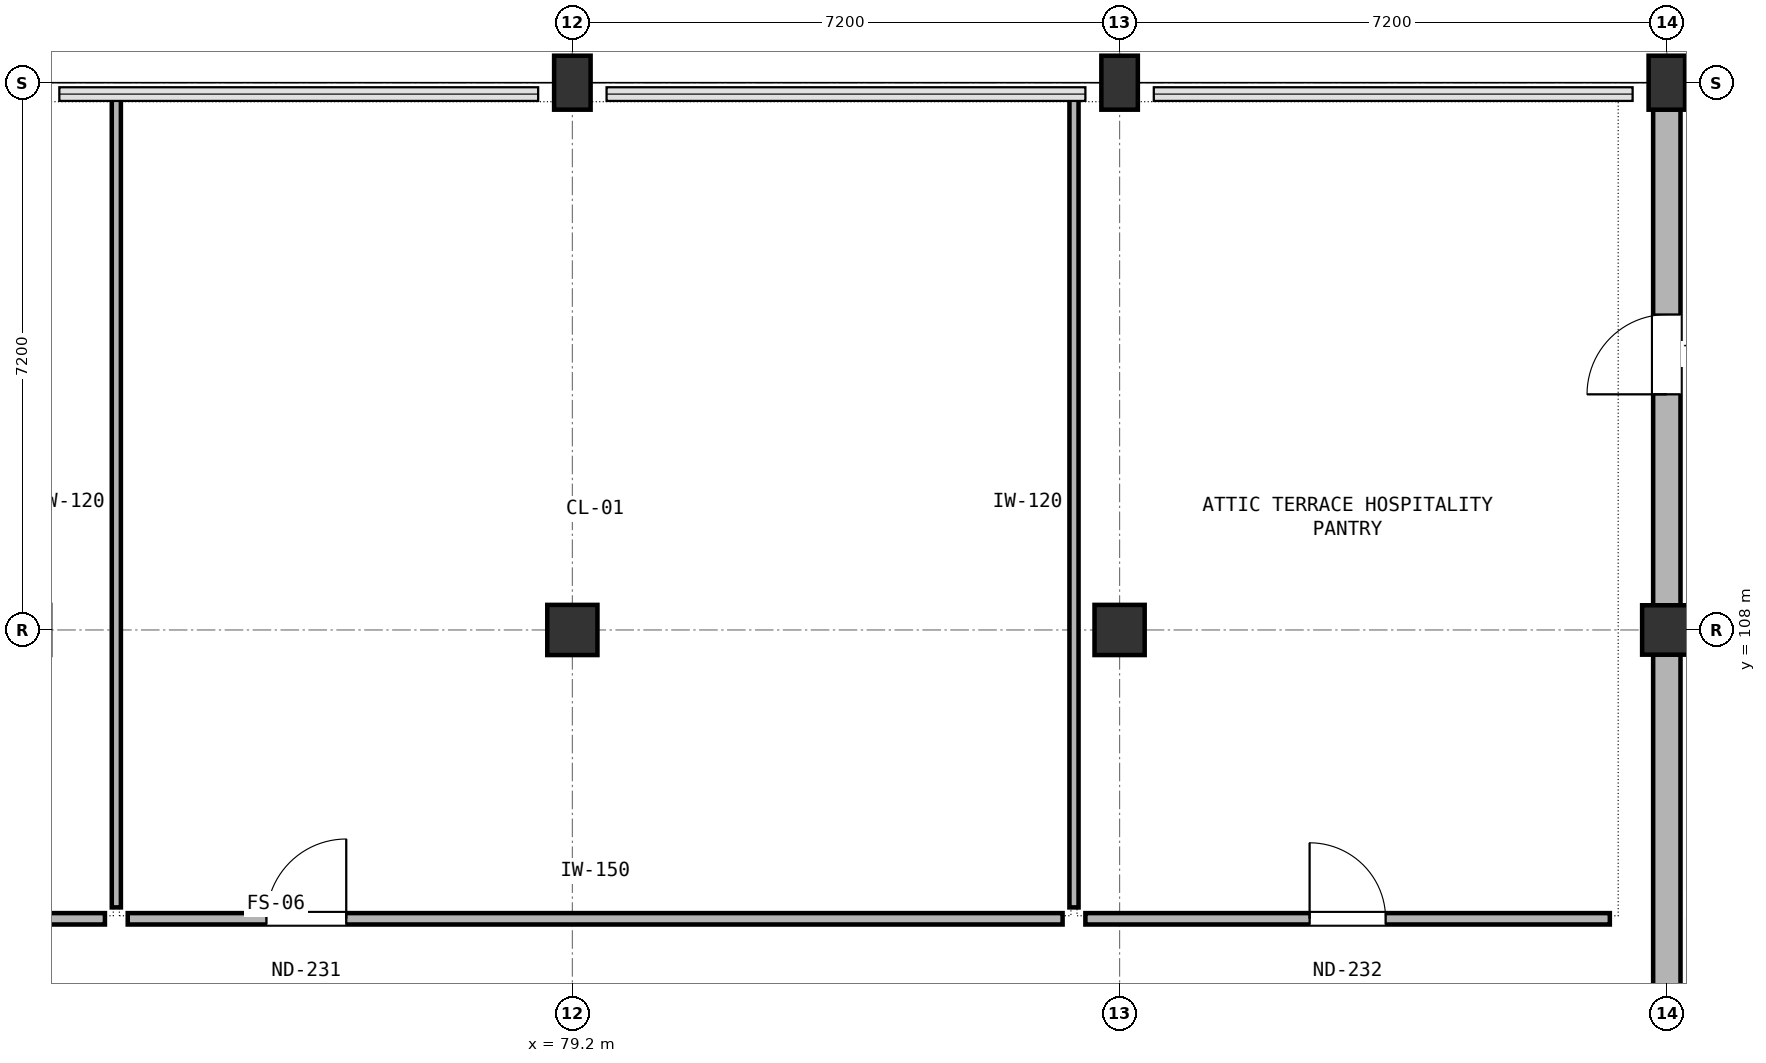
"""IFC4 building model, lengths in metres.
Left out: names, types, materials, properties, quantities, classifications, styles, units other than length and angle.
Written with IfcOpenShell. Run it as: python <this file> out.ifc"""

import sys

from ifc_helpers import new_model, si_unit, direction, frame, frame_2d, origin, origin_2d, place, context, subcontext, project, spatial, rectangle, extrude, element, fill, save


model = new_model("IFC4")
c1 = context("Model", 3, precision=1e-05, world=origin(), true_north=direction((0.0, 1.0)))
c2 = subcontext(c1, "Body", "Model", "MODEL_VIEW")
j1 = project(units=[si_unit("LENGTHUNIT", "METRE"), si_unit("PLANEANGLEUNIT", "RADIAN")], contexts=[c1])
p1 = place(None, origin())
s1 = spatial("IfcSite", under=j1, at=p1, CompositionType="ELEMENT")
p2 = place(p1, origin())
s2 = spatial("IfcBuilding", under=s1, at=p2, CompositionType="ELEMENT")
p3 = place(p2, frame((0.0, 0.0, 30.3)))
s3 = spatial("IfcBuildingStorey", under=s2, at=p3, CompositionType="ELEMENT", Elevation=30.3)
p4 = place(p3, frame((79.2, 108.0, 0.0), z_axis=(0.0, 0.0, 1.0), x_axis=(1.0, 0.0, 0.0)))
e1 = element("IfcColumn", 1, at=p4, inside=s3, PredefinedType="COLUMN", context=c2, shape_type="SweptSolid", body=[
    extrude(rectangle(XDim=0.66, YDim=0.66, at=origin_2d()), origin(), (0.0, 0.0, 1.0), 3.9),
])
p5 = place(p3, frame((79.2, 115.2, 0.0), z_axis=(0.0, 0.0, 1.0), x_axis=(1.0, 0.0, 0.0)))
e2 = element("IfcColumn", 2, at=p5, inside=s3, PredefinedType="COLUMN", context=c2, shape_type="SweptSolid", body=[
    extrude(rectangle(XDim=0.48, YDim=0.71, at=origin_2d()), origin(), (0.0, 0.0, 1.0), 3.9),
])
p6 = place(p3, frame((86.4, 108.0, 0.0), z_axis=(0.0, 0.0, 1.0), x_axis=(1.0, 0.0, 0.0)))
e3 = element("IfcColumn", 3, at=p6, inside=s3, PredefinedType="COLUMN", context=c2, shape_type="SweptSolid", body=[
    extrude(rectangle(XDim=0.66, YDim=0.66, at=origin_2d()), origin(), (0.0, 0.0, 1.0), 3.9),
])
p7 = place(p3, frame((86.4, 115.2, 0.0), z_axis=(0.0, 0.0, 1.0), x_axis=(1.0, 0.0, 0.0)))
e4 = element("IfcColumn", 4, at=p7, inside=s3, PredefinedType="COLUMN", context=c2, shape_type="SweptSolid", body=[
    extrude(rectangle(XDim=0.48, YDim=0.71, at=origin_2d()), origin(), (0.0, 0.0, 1.0), 3.9),
])
p8 = place(p3, frame((93.6, 108.0, 0.0), z_axis=(0.0, 0.0, 1.0), x_axis=(1.0, 0.0, 0.0)))
e5 = element("IfcColumn", 5, at=p8, inside=s3, PredefinedType="COLUMN", context=c2, shape_type="SweptSolid", body=[
    extrude(rectangle(XDim=0.65, YDim=0.65, at=origin_2d()), origin(), (0.0, 0.0, 1.0), 3.9),
])
p9 = place(p3, frame((93.6, 115.2, 0.0), z_axis=(0.0, 0.0, 1.0), x_axis=(1.0, 0.0, 0.0)))
e6 = element("IfcColumn", 6, at=p9, inside=s3, PredefinedType="COLUMN", context=c2, shape_type="SweptSolid", body=[
    extrude(rectangle(XDim=0.48, YDim=0.71, at=origin_2d()), origin(), (0.0, 0.0, 1.0), 3.9),
])
p10 = place(p3, frame((93.6, 107.677, 0.0), z_axis=(0.0, 0.0, 1.0), x_axis=(0.0, -1.0, 0.0)))
e7 = element("IfcWall", 7, at=p10, inside=s3, PredefinedType="SOLIDWALL", context=c2, shape_type="SweptSolid", body=[
    extrude(rectangle(XDim=6.554, YDim=0.36, at=frame_2d((3.277, 0.0))), origin(), (0.0, 0.0, 1.0), 2.74),
])
p11 = place(p3, frame((93.6, 114.847, 0.0), z_axis=(0.0, 0.0, 1.0), x_axis=(0.0, -1.0, 0.0)))
e8 = element("IfcWall", 8, at=p11, inside=s3, PredefinedType="SOLIDWALL", context=c2, shape_type="SweptSolid", body=[
    extrude(rectangle(XDim=6.524, YDim=0.36, at=frame_2d((3.262, 0.0))), origin(), (0.0, 0.0, 1.0), 2.74),
])
p12 = place(p11, frame((2.697, 0.0, 0.0)))
e9 = element("IfcOpeningElement", 9, at=p12, cuts=e8, PredefinedType="OPENING", context=c2, shape_type="SweptSolid", body=[
    extrude(rectangle(XDim=1.05, YDim=2.25, at=frame_2d((0.525, 1.125))), frame((0.0, 0.19, 0.0), z_axis=(0.0, -1.0, 0.0), x_axis=(1.0, 0.0, 0.0)), (0.0, 0.0, 1.0), 0.38),
])
p13 = place(p3, frame((57.75, 104.2, 0.0), z_axis=(0.0, 0.0, 1.0), x_axis=(1.0, 0.0, 0.0)))
e10 = element("IfcWall", 10, at=p13, inside=s3, PredefinedType="PARTITIONING", context=c2, shape_type="SweptSolid", body=[
    extrude(rectangle(XDim=15.3, YDim=0.15, at=frame_2d((7.65, 0.0))), origin(), (0.0, 0.0, 1.0), 2.78),
])
p14 = place(p13, frame((1.65, 0.0, 0.0)))
e11 = element("IfcOpeningElement", 11, at=p14, cuts=e10, PredefinedType="OPENING", context=c2, shape_type="SweptSolid", body=[
    extrude(rectangle(XDim=1.4, YDim=2.2, at=frame_2d((0.7, 1.1))), frame((0.0, 0.085, 0.0), z_axis=(0.0, -1.0, 0.0), x_axis=(1.0, 0.0, 0.0)), (0.0, 0.0, 1.0), 0.17),
])
p15 = place(p3, frame((73.35, 104.2, 0.0), z_axis=(0.0, 0.0, 1.0), x_axis=(1.0, 0.0, 0.0)))
e12 = element("IfcWall", 12, at=p15, inside=s3, PredefinedType="PARTITIONING", context=c2, shape_type="SweptSolid", body=[
    extrude(rectangle(XDim=12.3, YDim=0.15, at=frame_2d((6.15, 0.0))), origin(), (0.0, 0.0, 1.0), 2.78),
])
p16 = place(p15, frame((1.825, 0.0, 0.0)))
e13 = element("IfcOpeningElement", 13, at=p16, cuts=e12, PredefinedType="OPENING", context=c2, shape_type="SweptSolid", body=[
    extrude(rectangle(XDim=1.05, YDim=2.15, at=frame_2d((0.525, 1.075))), frame((0.0, 0.085, 0.0), z_axis=(0.0, -1.0, 0.0), x_axis=(1.0, 0.0, 0.0)), (0.0, 0.0, 1.0), 0.17),
])
p17 = place(p3, frame((73.2, 104.35, 0.0), z_axis=(0.0, 0.0, 1.0), x_axis=(0.0, 1.0, 0.0)))
e14 = element("IfcWall", 14, at=p17, inside=s3, PredefinedType="PARTITIONING", context=c2, shape_type="SweptSolid", body=[
    extrude(rectangle(XDim=10.67, YDim=0.12, at=frame_2d((5.335, 0.0))), origin(), (0.0, 0.0, 1.0), 2.78),
])
p18 = place(p3, frame((85.95, 104.2, 0.0), z_axis=(0.0, 0.0, 1.0), x_axis=(1.0, 0.0, 0.0)))
e15 = element("IfcWall", 15, at=p18, inside=s3, PredefinedType="PARTITIONING", context=c2, shape_type="SweptSolid", body=[
    extrude(rectangle(XDim=6.9, YDim=0.15, at=frame_2d((3.45, 0.0))), origin(), (0.0, 0.0, 1.0), 2.78),
])
p19 = place(p18, frame((2.95, 0.0, 0.0)))
e16 = element("IfcOpeningElement", 16, at=p19, cuts=e15, PredefinedType="OPENING", context=c2, shape_type="SweptSolid", body=[
    extrude(rectangle(XDim=1.0, YDim=2.15, at=frame_2d((0.5, 1.075))), frame((0.0, 0.085, 0.0), z_axis=(0.0, -1.0, 0.0), x_axis=(1.0, 0.0, 0.0)), (0.0, 0.0, 1.0), 0.17),
])
p20 = place(p3, frame((85.8, 104.35, 0.0), z_axis=(0.0, 0.0, 1.0), x_axis=(0.0, 1.0, 0.0)))
e17 = element("IfcWall", 17, at=p20, inside=s3, PredefinedType="PARTITIONING", context=c2, shape_type="SweptSolid", body=[
    extrude(rectangle(XDim=10.67, YDim=0.12, at=frame_2d((5.335, 0.0))), origin(), (0.0, 0.0, 1.0), 2.78),
])
p21 = place(p12, frame((1.05, 0.0, 0.0), z_axis=(0.0, 0.0, 1.0), x_axis=(-1.0, 0.0, 0.0)))
e18 = element("IfcDoor", 18, at=p21, inside=s3, OperationType="SINGLE_SWING_LEFT", PredefinedType="DOOR", context=c2, shape_type="SweptSolid", body=[
    extrude(rectangle(XDim=1.05, YDim=2.25, at=frame_2d((0.525, 1.125))), frame((0.0, 0.025, 0.0), z_axis=(0.0, -1.0, 0.0), x_axis=(1.0, 0.0, 0.0)), (0.0, 0.0, 1.0), 0.05),
])
fill(e9, e18)
p22 = place(p16, origin())
e19 = element("IfcDoor", 19, at=p22, inside=s3, OperationType="SINGLE_SWING_RIGHT", PredefinedType="DOOR", context=c2, shape_type="SweptSolid", body=[
    extrude(rectangle(XDim=1.05, YDim=2.15, at=frame_2d((0.525, 1.075))), frame((0.0, 0.025, 0.0), z_axis=(0.0, -1.0, 0.0), x_axis=(1.0, 0.0, 0.0)), (0.0, 0.0, 1.0), 0.05),
])
fill(e13, e19)
p23 = place(p19, origin())
e20 = element("IfcDoor", 20, at=p23, inside=s3, OperationType="SINGLE_SWING_LEFT", PredefinedType="DOOR", context=c2, shape_type="SweptSolid", body=[
    extrude(rectangle(XDim=1.0, YDim=2.15, at=frame_2d((0.5, 1.075))), frame((0.0, 0.025, 0.0), z_axis=(0.0, -1.0, 0.0), x_axis=(1.0, 0.0, 0.0)), (0.0, 0.0, 1.0), 0.05),
])
fill(e16, e20)
save(model, sys.argv[1])
